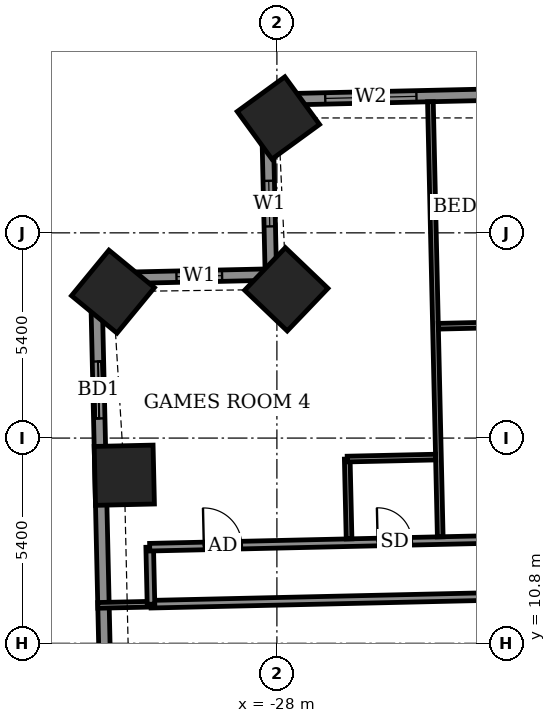
"""IFC4 building model, lengths in metres.
Left out: names, types, materials, properties, quantities, classifications, styles, units other than length and angle.
Written with IfcOpenShell. Run it as: python <this file> out.ifc"""

import sys

from ifc_helpers import new_model, si_unit, direction, frame, frame_2d, origin, origin_2d, place, context, subcontext, project, spatial, rectangle, extrude, element, fill, save


model = new_model("IFC4")
c1 = context("Model", 3, precision=1e-05, world=origin(), true_north=direction((0.0, 1.0)))
c2 = subcontext(c1, "Body", "Model", "MODEL_VIEW")
j1 = project(units=[si_unit("LENGTHUNIT", "METRE"), si_unit("PLANEANGLEUNIT", "RADIAN")], contexts=[c1])
p1 = place(None, origin())
s1 = spatial("IfcSite", under=j1, at=p1, CompositionType="ELEMENT")
p2 = place(p1, origin())
s2 = spatial("IfcBuilding", under=s1, at=p2, CompositionType="ELEMENT")
p3 = place(p2, frame((0.0, 0.0, 41.3)))
s3 = spatial("IfcBuildingStorey", under=s2, at=p3, CompositionType="ELEMENT", Elevation=41.3)
for number, where, z_axis, x_axis in (
    (1, (-27.961, 24.623, -0.55), (0.0, 0.0, 1.0), (-0.808, -0.589, 0.0)),
    (2, (-27.753, 20.115, -0.55), (0.0, 0.0, 1.0), (-0.691, -0.723, 0.0)),
    (3, (-32.313, 20.053, -0.55), (0.0, 0.0, 1.0), (-0.635, -0.772, 0.0)),
    (4, (-32.015, 15.223, -0.55), (0.0, 0.0, 1.0), (0.023, -1.0, 0.0)),
):
    element("IfcColumn", number, at=place(p3, frame(where, z_axis=z_axis, x_axis=x_axis)), inside=s3, PredefinedType="COLUMN", context=c2, shape_type="SweptSolid", body=[
        extrude(rectangle(XDim=1.55, YDim=1.55, at=origin_2d()), origin(), (0.0, 0.0, 1.0), 3.6),
    ])
p4 = place(p3, frame((24.423, 26.298, 0.0), z_axis=(0.0, 0.0, 1.0), x_axis=(-0.999742433108, -0.022695097355, 0.0)))
e5 = element("IfcWall", 5, at=p4, inside=s3, PredefinedType="SOLIDWALL", context=c2, shape_type="SweptSolid", body=[
    extrude(rectangle(XDim=52.701, YDim=0.3, at=frame_2d((26.35, 0.0))), origin(), (0.0, 0.0, 1.0), 3.05),
])
p5 = place(p4, frame((2.357, 0.0, 0.0)))
e6 = element("IfcOpeningElement", 6, at=p5, cuts=e5, PredefinedType="OPENING", context=c2, shape_type="SweptSolid", body=[
    extrude(rectangle(XDim=1.5, YDim=2.4, at=frame_2d((0.75, 1.2))), frame((0.0, 0.16, 0.0), z_axis=(0.0, -1.0, 0.0), x_axis=(1.0, 0.0, 0.0)), (0.0, 0.0, 1.0), 0.32),
])
p6 = place(p4, frame((7.475, 0.0, 0.0)))
e7 = element("IfcOpeningElement", 7, at=p6, cuts=e5, PredefinedType="OPENING", context=c2, shape_type="SweptSolid", body=[
    extrude(rectangle(XDim=1.5, YDim=2.4, at=frame_2d((0.75, 1.2))), frame((0.0, 0.16, 0.0), z_axis=(0.0, -1.0, 0.0), x_axis=(1.0, 0.0, 0.0)), (0.0, 0.0, 1.0), 0.32),
])
p7 = place(p4, frame((10.262, 0.0, 0.0)))
e8 = element("IfcOpeningElement", 8, at=p7, cuts=e5, PredefinedType="OPENING", context=c2, shape_type="SweptSolid", body=[
    extrude(rectangle(XDim=1.5, YDim=2.4, at=frame_2d((0.75, 1.2))), frame((0.0, 0.16, 0.0), z_axis=(0.0, -1.0, 0.0), x_axis=(1.0, 0.0, 0.0)), (0.0, 0.0, 1.0), 0.32),
])
p8 = place(p4, frame((15.1, 0.0, 0.0)))
e9 = element("IfcOpeningElement", 9, at=p8, cuts=e5, PredefinedType="OPENING", context=c2, shape_type="SweptSolid", body=[
    extrude(rectangle(XDim=1.5, YDim=2.4, at=frame_2d((0.75, 1.2))), frame((0.0, 0.16, 0.0), z_axis=(0.0, -1.0, 0.0), x_axis=(1.0, 0.0, 0.0)), (0.0, 0.0, 1.0), 0.32),
])
p9 = place(p4, frame((20.7, 0.0, 0.0)))
e10 = element("IfcOpeningElement", 10, at=p9, cuts=e5, PredefinedType="OPENING", context=c2, shape_type="SweptSolid", body=[
    extrude(rectangle(XDim=1.2, YDim=2.4, at=frame_2d((0.6, 1.2))), frame((0.0, 0.16, 0.0), z_axis=(0.0, -1.0, 0.0), x_axis=(1.0, 0.0, 0.0)), (0.0, 0.0, 1.0), 0.32),
])
p10 = place(p4, frame((23.337, 0.0, 0.0)))
e11 = element("IfcOpeningElement", 11, at=p10, cuts=e5, PredefinedType="OPENING", context=c2, shape_type="SweptSolid", body=[
    extrude(rectangle(XDim=1.5, YDim=2.4, at=frame_2d((0.75, 1.2))), frame((0.0, 0.16, 0.0), z_axis=(0.0, -1.0, 0.0), x_axis=(1.0, 0.0, 0.0)), (0.0, 0.0, 1.0), 0.32),
])
p11 = place(p4, frame((28.238, 0.0, 0.0)))
e12 = element("IfcOpeningElement", 12, at=p11, cuts=e5, PredefinedType="OPENING", context=c2, shape_type="SweptSolid", body=[
    extrude(rectangle(XDim=1.5, YDim=2.4, at=frame_2d((0.75, 1.2))), frame((0.0, 0.16, 0.0), z_axis=(0.0, -1.0, 0.0), x_axis=(1.0, 0.0, 0.0)), (0.0, 0.0, 1.0), 0.32),
])
p12 = place(p4, frame((33.9, 0.0, 0.0)))
e13 = element("IfcOpeningElement", 13, at=p12, cuts=e5, PredefinedType="OPENING", context=c2, shape_type="SweptSolid", body=[
    extrude(rectangle(XDim=1.2, YDim=2.4, at=frame_2d((0.6, 1.2))), frame((0.0, 0.16, 0.0), z_axis=(0.0, -1.0, 0.0), x_axis=(1.0, 0.0, 0.0)), (0.0, 0.0, 1.0), 0.32),
])
p13 = place(p4, frame((36.538, 0.0, 0.0)))
e14 = element("IfcOpeningElement", 14, at=p13, cuts=e5, PredefinedType="OPENING", context=c2, shape_type="SweptSolid", body=[
    extrude(rectangle(XDim=1.5, YDim=2.4, at=frame_2d((0.75, 1.2))), frame((0.0, 0.16, 0.0), z_axis=(0.0, -1.0, 0.0), x_axis=(1.0, 0.0, 0.0)), (0.0, 0.0, 1.0), 0.32),
])
p14 = place(p4, frame((41.338, 0.0, 0.0)))
e15 = element("IfcOpeningElement", 15, at=p14, cuts=e5, PredefinedType="OPENING", context=c2, shape_type="SweptSolid", body=[
    extrude(rectangle(XDim=1.5, YDim=2.4, at=frame_2d((0.75, 1.2))), frame((0.0, 0.16, 0.0), z_axis=(0.0, -1.0, 0.0), x_axis=(1.0, 0.0, 0.0)), (0.0, 0.0, 1.0), 0.32),
])
p15 = place(p4, frame((44.4, 0.0, 0.9)))
e16 = element("IfcOpeningElement", 16, at=p15, cuts=e5, PredefinedType="OPENING", context=c2, shape_type="SweptSolid", body=[
    extrude(rectangle(XDim=0.9, YDim=1.5, at=frame_2d((0.45, 0.75))), frame((0.0, 0.16, 0.0), z_axis=(0.0, -1.0, 0.0), x_axis=(1.0, 0.0, 0.0)), (0.0, 0.0, 1.0), 0.32),
])
p16 = place(p4, frame((48.764, 0.0, 0.9)))
e17 = element("IfcOpeningElement", 17, at=p16, cuts=e5, PredefinedType="OPENING", context=c2, shape_type="SweptSolid", body=[
    extrude(rectangle(XDim=2.4, YDim=1.5, at=frame_2d((1.2, 0.75))), frame((0.0, 0.16, 0.0), z_axis=(0.0, -1.0, 0.0), x_axis=(1.0, 0.0, 0.0)), (0.0, 0.0, 1.0), 0.32),
])
p17 = place(p3, frame((-28.264, 25.102, 0.0), z_axis=(0.0, 0.0, 1.0), x_axis=(0.022820258049, -0.999739584003, 0.0)))
e18 = element("IfcWall", 18, at=p17, inside=s3, PredefinedType="SOLIDWALL", context=c2, shape_type="SweptSolid", body=[
    extrude(rectangle(XDim=4.6, YDim=0.3, at=frame_2d((2.3, 0.0))), origin(), (0.0, 0.0, 1.0), 2.55),
])
p18 = place(p17, frame((2.133, 0.0, 0.9)))
e19 = element("IfcOpeningElement", 19, at=p18, cuts=e18, PredefinedType="OPENING", context=c2, shape_type="SweptSolid", body=[
    extrude(rectangle(XDim=1.2, YDim=1.5, at=frame_2d((0.6, 0.75))), frame((0.0, 0.16, 0.0), z_axis=(0.0, -1.0, 0.0), x_axis=(1.0, 0.0, 0.0)), (0.0, 0.0, 1.0), 0.32),
])
p19 = place(p3, frame((-28.159, 20.503, 0.0), z_axis=(0.0, 0.0, 1.0), x_axis=(-0.999744404568, -0.02260808559, 0.0)))
e20 = element("IfcWall", 20, at=p19, inside=s3, PredefinedType="SOLIDWALL", context=c2, shape_type="SweptSolid", body=[
    extrude(rectangle(XDim=4.6, YDim=0.3, at=frame_2d((2.3, 0.0))), origin(), (0.0, 0.0, 1.0), 3.05),
])
p20 = place(p19, frame((1.284, 0.0, 0.9)))
e21 = element("IfcOpeningElement", 21, at=p20, cuts=e20, PredefinedType="OPENING", context=c2, shape_type="SweptSolid", body=[
    extrude(rectangle(XDim=1.2, YDim=1.5, at=frame_2d((0.6, 0.75))), frame((0.0, 0.16, 0.0), z_axis=(0.0, -1.0, 0.0), x_axis=(1.0, 0.0, 0.0)), (0.0, 0.0, 1.0), 0.32),
])
p21 = place(p3, frame((-32.758, 20.399, 0.0), z_axis=(0.0, 0.0, 1.0), x_axis=(0.022668485183, -0.999743036875, 0.0)))
e22 = element("IfcWall", 22, at=p21, inside=s3, PredefinedType="SOLIDWALL", context=c2, shape_type="SweptSolid", body=[
    extrude(rectangle(XDim=15.929, YDim=0.3, at=frame_2d((7.964, 0.0))), origin(), (0.0, 0.0, 1.0), 3.05),
])
p22 = place(p21, frame((2.183, 0.0, 0.0)))
e23 = element("IfcOpeningElement", 23, at=p22, cuts=e22, PredefinedType="OPENING", context=c2, shape_type="SweptSolid", body=[
    extrude(rectangle(XDim=1.5, YDim=2.4, at=frame_2d((0.75, 1.2))), frame((0.0, 0.16, 0.0), z_axis=(0.0, -1.0, 0.0), x_axis=(1.0, 0.0, 0.0)), (0.0, 0.0, 1.0), 0.32),
])
p23 = place(p21, frame((12.004, 0.0, 0.9)))
e24 = element("IfcOpeningElement", 24, at=p23, cuts=e22, PredefinedType="OPENING", context=c2, shape_type="SweptSolid", body=[
    extrude(rectangle(XDim=2.4, YDim=1.5, at=frame_2d((1.2, 0.75))), frame((0.0, 0.16, 0.0), z_axis=(0.0, -1.0, 0.0), x_axis=(1.0, 0.0, 0.0)), (0.0, 0.0, 1.0), 0.32),
])
p24 = place(p3, frame((-32.713, 11.798, 0.0), z_axis=(0.0, 0.0, 1.0), x_axis=(0.999756172383, 0.022081571112, 0.0)))
e25 = element("IfcWall", 25, at=p24, inside=s3, PredefinedType="PARTITIONING", context=c2, shape_type="SweptSolid", body=[
    extrude(rectangle(XDim=1.404, YDim=0.15, at=frame_2d((0.702, 0.0))), origin(), (0.0, 0.0, 1.0), 2.55),
])
p25 = place(p3, frame((-31.313, 11.829, 0.0), z_axis=(0.0, 0.0, 1.0), x_axis=(0.999742346277, 0.022698921993, 0.0)))
e26 = element("IfcWall", 26, at=p25, inside=s3, PredefinedType="PARTITIONING", context=c2, shape_type="SweptSolid", body=[
    extrude(rectangle(XDim=11.1, YDim=0.2, at=frame_2d((5.55, 0.0))), origin(), (0.0, 0.0, 1.0), 3.05),
])
p26 = place(p3, frame((-31.313, 11.829, 0.0), z_axis=(0.0, 0.0, 1.0), x_axis=(-0.022617910375, 0.999744182344, 0.0)))
e27 = element("IfcWall", 27, at=p26, inside=s3, PredefinedType="PARTITIONING", context=c2, shape_type="SweptSolid", body=[
    extrude(rectangle(XDim=1.5, YDim=0.2, at=frame_2d((0.75, 0.0))), origin(), (0.0, 0.0, 1.0), 3.05),
])
p27 = place(p3, frame((-31.347, 13.329, 0.0), z_axis=(0.0, 0.0, 1.0), x_axis=(0.999742613079, 0.022687168058, 0.0)))
e28 = element("IfcWall", 28, at=p27, inside=s3, PredefinedType="PARTITIONING", context=c2, shape_type="SweptSolid", body=[
    extrude(rectangle(XDim=58.799, YDim=0.2, at=frame_2d((29.399, 0.0))), origin(), (0.0, 0.0, 1.0), 3.05),
])
p28 = place(p27, frame((56.45, 0.0, 0.0)))
e29 = element("IfcOpeningElement", 29, at=p28, cuts=e28, PredefinedType="OPENING", context=c2, shape_type="SweptSolid", body=[
    extrude(rectangle(XDim=1.0, YDim=2.1, at=frame_2d((0.5, 1.05))), frame((0.0, 0.11, 0.0), z_axis=(0.0, -1.0, 0.0), x_axis=(1.0, 0.0, 0.0)), (0.0, 0.0, 1.0), 0.22),
])
p29 = place(p27, frame((51.85, 0.0, 0.0)))
e30 = element("IfcOpeningElement", 30, at=p29, cuts=e28, PredefinedType="OPENING", context=c2, shape_type="SweptSolid", body=[
    extrude(rectangle(XDim=0.9, YDim=2.1, at=frame_2d((0.45, 1.05))), frame((0.0, 0.11, 0.0), z_axis=(0.0, -1.0, 0.0), x_axis=(1.0, 0.0, 0.0)), (0.0, 0.0, 1.0), 0.22),
])
p30 = place(p27, frame((47.1, 0.0, 0.0)))
e31 = element("IfcOpeningElement", 31, at=p30, cuts=e28, PredefinedType="OPENING", context=c2, shape_type="SweptSolid", body=[
    extrude(rectangle(XDim=0.9, YDim=2.1, at=frame_2d((0.45, 1.05))), frame((0.0, 0.11, 0.0), z_axis=(0.0, -1.0, 0.0), x_axis=(1.0, 0.0, 0.0)), (0.0, 0.0, 1.0), 0.22),
])
p31 = place(p27, frame((45.225, 0.0, 0.0)))
e32 = element("IfcOpeningElement", 32, at=p31, cuts=e28, PredefinedType="OPENING", context=c2, shape_type="SweptSolid", body=[
    extrude(rectangle(XDim=0.9, YDim=2.1, at=frame_2d((0.45, 1.05))), frame((0.0, 0.11, 0.0), z_axis=(0.0, -1.0, 0.0), x_axis=(1.0, 0.0, 0.0)), (0.0, 0.0, 1.0), 0.22),
])
p32 = place(p27, frame((38.55, 0.0, 0.0)))
e33 = element("IfcOpeningElement", 33, at=p32, cuts=e28, PredefinedType="OPENING", context=c2, shape_type="SweptSolid", body=[
    extrude(rectangle(XDim=0.9, YDim=2.1, at=frame_2d((0.45, 1.05))), frame((0.0, 0.11, 0.0), z_axis=(0.0, -1.0, 0.0), x_axis=(1.0, 0.0, 0.0)), (0.0, 0.0, 1.0), 0.22),
])
p33 = place(p27, frame((36.625, 0.0, 0.0)))
e34 = element("IfcOpeningElement", 34, at=p33, cuts=e28, PredefinedType="OPENING", context=c2, shape_type="SweptSolid", body=[
    extrude(rectangle(XDim=0.9, YDim=2.1, at=frame_2d((0.45, 1.05))), frame((0.0, 0.11, 0.0), z_axis=(0.0, -1.0, 0.0), x_axis=(1.0, 0.0, 0.0)), (0.0, 0.0, 1.0), 0.22),
])
p34 = place(p27, frame((29.875, 0.0, 0.0)))
e35 = element("IfcOpeningElement", 35, at=p34, cuts=e28, PredefinedType="OPENING", context=c2, shape_type="SweptSolid", body=[
    extrude(rectangle(XDim=0.9, YDim=2.1, at=frame_2d((0.45, 1.05))), frame((0.0, 0.11, 0.0), z_axis=(0.0, -1.0, 0.0), x_axis=(1.0, 0.0, 0.0)), (0.0, 0.0, 1.0), 0.22),
])
p35 = place(p27, frame((27.9, 0.0, 0.0)))
e36 = element("IfcOpeningElement", 36, at=p35, cuts=e28, PredefinedType="OPENING", context=c2, shape_type="SweptSolid", body=[
    extrude(rectangle(XDim=0.9, YDim=2.1, at=frame_2d((0.45, 1.05))), frame((0.0, 0.11, 0.0), z_axis=(0.0, -1.0, 0.0), x_axis=(1.0, 0.0, 0.0)), (0.0, 0.0, 1.0), 0.22),
])
p36 = place(p27, frame((21.1, 0.0, 0.0)))
e37 = element("IfcOpeningElement", 37, at=p36, cuts=e28, PredefinedType="OPENING", context=c2, shape_type="SweptSolid", body=[
    extrude(rectangle(XDim=0.9, YDim=2.1, at=frame_2d((0.45, 1.05))), frame((0.0, 0.11, 0.0), z_axis=(0.0, -1.0, 0.0), x_axis=(1.0, 0.0, 0.0)), (0.0, 0.0, 1.0), 0.22),
])
p37 = place(p27, frame((19.175, 0.0, 0.0)))
e38 = element("IfcOpeningElement", 38, at=p37, cuts=e28, PredefinedType="OPENING", context=c2, shape_type="SweptSolid", body=[
    extrude(rectangle(XDim=0.9, YDim=2.1, at=frame_2d((0.45, 1.05))), frame((0.0, 0.11, 0.0), z_axis=(0.0, -1.0, 0.0), x_axis=(1.0, 0.0, 0.0)), (0.0, 0.0, 1.0), 0.22),
])
p38 = place(p27, frame((12.5, 0.0, 0.0)))
e39 = element("IfcOpeningElement", 39, at=p38, cuts=e28, PredefinedType="OPENING", context=c2, shape_type="SweptSolid", body=[
    extrude(rectangle(XDim=0.9, YDim=2.1, at=frame_2d((0.45, 1.05))), frame((0.0, 0.11, 0.0), z_axis=(0.0, -1.0, 0.0), x_axis=(1.0, 0.0, 0.0)), (0.0, 0.0, 1.0), 0.22),
])
p39 = place(p27, frame((10.575, 0.0, 0.0)))
e40 = element("IfcOpeningElement", 40, at=p39, cuts=e28, PredefinedType="OPENING", context=c2, shape_type="SweptSolid", body=[
    extrude(rectangle(XDim=0.9, YDim=2.1, at=frame_2d((0.45, 1.05))), frame((0.0, 0.11, 0.0), z_axis=(0.0, -1.0, 0.0), x_axis=(1.0, 0.0, 0.0)), (0.0, 0.0, 1.0), 0.22),
])
p40 = place(p27, frame((1.425, 0.0, 0.0)))
e41 = element("IfcOpeningElement", 41, at=p40, cuts=e28, PredefinedType="OPENING", context=c2, shape_type="SweptSolid", body=[
    extrude(rectangle(XDim=1.0, YDim=2.1, at=frame_2d((0.5, 1.05))), frame((0.0, 0.11, 0.0), z_axis=(0.0, -1.0, 0.0), x_axis=(1.0, 0.0, 0.0)), (0.0, 0.0, 1.0), 0.22),
])
p41 = place(p27, frame((6.0, 0.0, 0.0)))
e42 = element("IfcOpeningElement", 42, at=p41, cuts=e28, PredefinedType="OPENING", context=c2, shape_type="SweptSolid", body=[
    extrude(rectangle(XDim=0.9, YDim=2.1, at=frame_2d((0.45, 1.05))), frame((0.0, 0.11, 0.0), z_axis=(0.0, -1.0, 0.0), x_axis=(1.0, 0.0, 0.0)), (0.0, 0.0, 1.0), 0.22),
])
p42 = place(p3, frame((-26.101, 13.548, 0.0), z_axis=(0.0, 0.0, 1.0), x_axis=(-0.022782133344, 0.999740453518, 0.0)))
e43 = element("IfcWall", 43, at=p42, inside=s3, PredefinedType="PARTITIONING", context=c2, shape_type="SweptSolid", body=[
    extrude(rectangle(XDim=2.1, YDim=0.15, at=frame_2d((1.05, 0.0))), origin(), (0.0, 0.0, 1.0), 3.05),
])
p43 = place(p3, frame((-23.702, 13.602, 0.0), z_axis=(0.0, 0.0, 1.0), x_axis=(-0.022621153305, 0.999744108971, 0.0)))
e44 = element("IfcWall", 44, at=p43, inside=s3, PredefinedType="PARTITIONING", context=c2, shape_type="SweptSolid", body=[
    extrude(rectangle(XDim=11.451, YDim=0.15, at=frame_2d((5.726, 0.0))), origin(), (0.0, 0.0, 1.0), 2.55),
])
p44 = place(p3, frame((-26.149, 15.648, 0.0), z_axis=(0.0, 0.0, 1.0), x_axis=(0.999749954681, 0.022361308448, 0.0)))
e45 = element("IfcWall", 45, at=p44, inside=s3, PredefinedType="PARTITIONING", context=c2, shape_type="SweptSolid", body=[
    extrude(rectangle(XDim=2.325, YDim=0.15, at=frame_2d((1.163, 0.0))), origin(), (0.0, 0.0, 1.0), 3.05),
])
p45 = place(p3, frame((-23.752, 19.143, 0.0), z_axis=(0.0, 0.0, 1.0), x_axis=(0.999740260747, 0.02279059109, 0.0)))
e46 = element("IfcWall", 46, at=p45, inside=s3, PredefinedType="PARTITIONING", context=c2, shape_type="SweptSolid", body=[
    extrude(rectangle(XDim=2.324, YDim=0.15, at=frame_2d((1.162, 0.0))), origin(), (0.0, 0.0, 1.0), 3.05),
])
p46 = place(p16, origin())
e47 = element("IfcWindow", 47, at=p46, inside=s3, PartitioningType="DOUBLE_PANEL_VERTICAL", PredefinedType="WINDOW", context=c2, shape_type="SweptSolid", body=[
    extrude(rectangle(XDim=2.4, YDim=1.5, at=frame_2d((1.2, 0.75))), frame((0.0, 0.03, 0.0), z_axis=(0.0, -1.0, 0.0), x_axis=(1.0, 0.0, 0.0)), (0.0, 0.0, 1.0), 0.06),
])
fill(e17, e47)
p47 = place(p18, origin())
e48 = element("IfcWindow", 48, at=p47, inside=s3, PartitioningType="SINGLE_PANEL", PredefinedType="WINDOW", context=c2, shape_type="SweptSolid", body=[
    extrude(rectangle(XDim=1.2, YDim=1.5, at=frame_2d((0.6, 0.75))), frame((0.0, 0.03, 0.0), z_axis=(0.0, -1.0, 0.0), x_axis=(1.0, 0.0, 0.0)), (0.0, 0.0, 1.0), 0.06),
])
fill(e19, e48)
p48 = place(p20, origin())
e49 = element("IfcWindow", 49, at=p48, inside=s3, PartitioningType="SINGLE_PANEL", PredefinedType="WINDOW", context=c2, shape_type="SweptSolid", body=[
    extrude(rectangle(XDim=1.2, YDim=1.5, at=frame_2d((0.6, 0.75))), frame((0.0, 0.03, 0.0), z_axis=(0.0, -1.0, 0.0), x_axis=(1.0, 0.0, 0.0)), (0.0, 0.0, 1.0), 0.06),
])
fill(e21, e49)
p49 = place(p22, origin())
e50 = element("IfcDoor", 50, at=p49, inside=s3, OperationType="SLIDING_TO_LEFT", PredefinedType="DOOR", context=c2, shape_type="SweptSolid", body=[
    extrude(rectangle(XDim=1.5, YDim=2.4, at=frame_2d((0.75, 1.2))), frame((0.0, 0.025, 0.0), z_axis=(0.0, -1.0, 0.0), x_axis=(1.0, 0.0, 0.0)), (0.0, 0.0, 1.0), 0.05),
])
fill(e23, e50)
p50 = place(p40, origin())
e51 = element("IfcDoor", 51, at=p50, inside=s3, OperationType="SINGLE_SWING_RIGHT", PredefinedType="DOOR", context=c2, shape_type="SweptSolid", body=[
    extrude(rectangle(XDim=1.0, YDim=2.1, at=frame_2d((0.5, 1.05))), frame((0.0, 0.025, 0.0), z_axis=(0.0, -1.0, 0.0), x_axis=(1.0, 0.0, 0.0)), (0.0, 0.0, 1.0), 0.05),
])
fill(e41, e51)
p51 = place(p41, origin())
e52 = element("IfcDoor", 52, at=p51, inside=s3, OperationType="SINGLE_SWING_LEFT", PredefinedType="DOOR", context=c2, shape_type="SweptSolid", body=[
    extrude(rectangle(XDim=0.9, YDim=2.1, at=frame_2d((0.45, 1.05))), frame((0.0, 0.025, 0.0), z_axis=(0.0, -1.0, 0.0), x_axis=(1.0, 0.0, 0.0)), (0.0, 0.0, 1.0), 0.05),
])
fill(e42, e52)
save(model, sys.argv[1])
